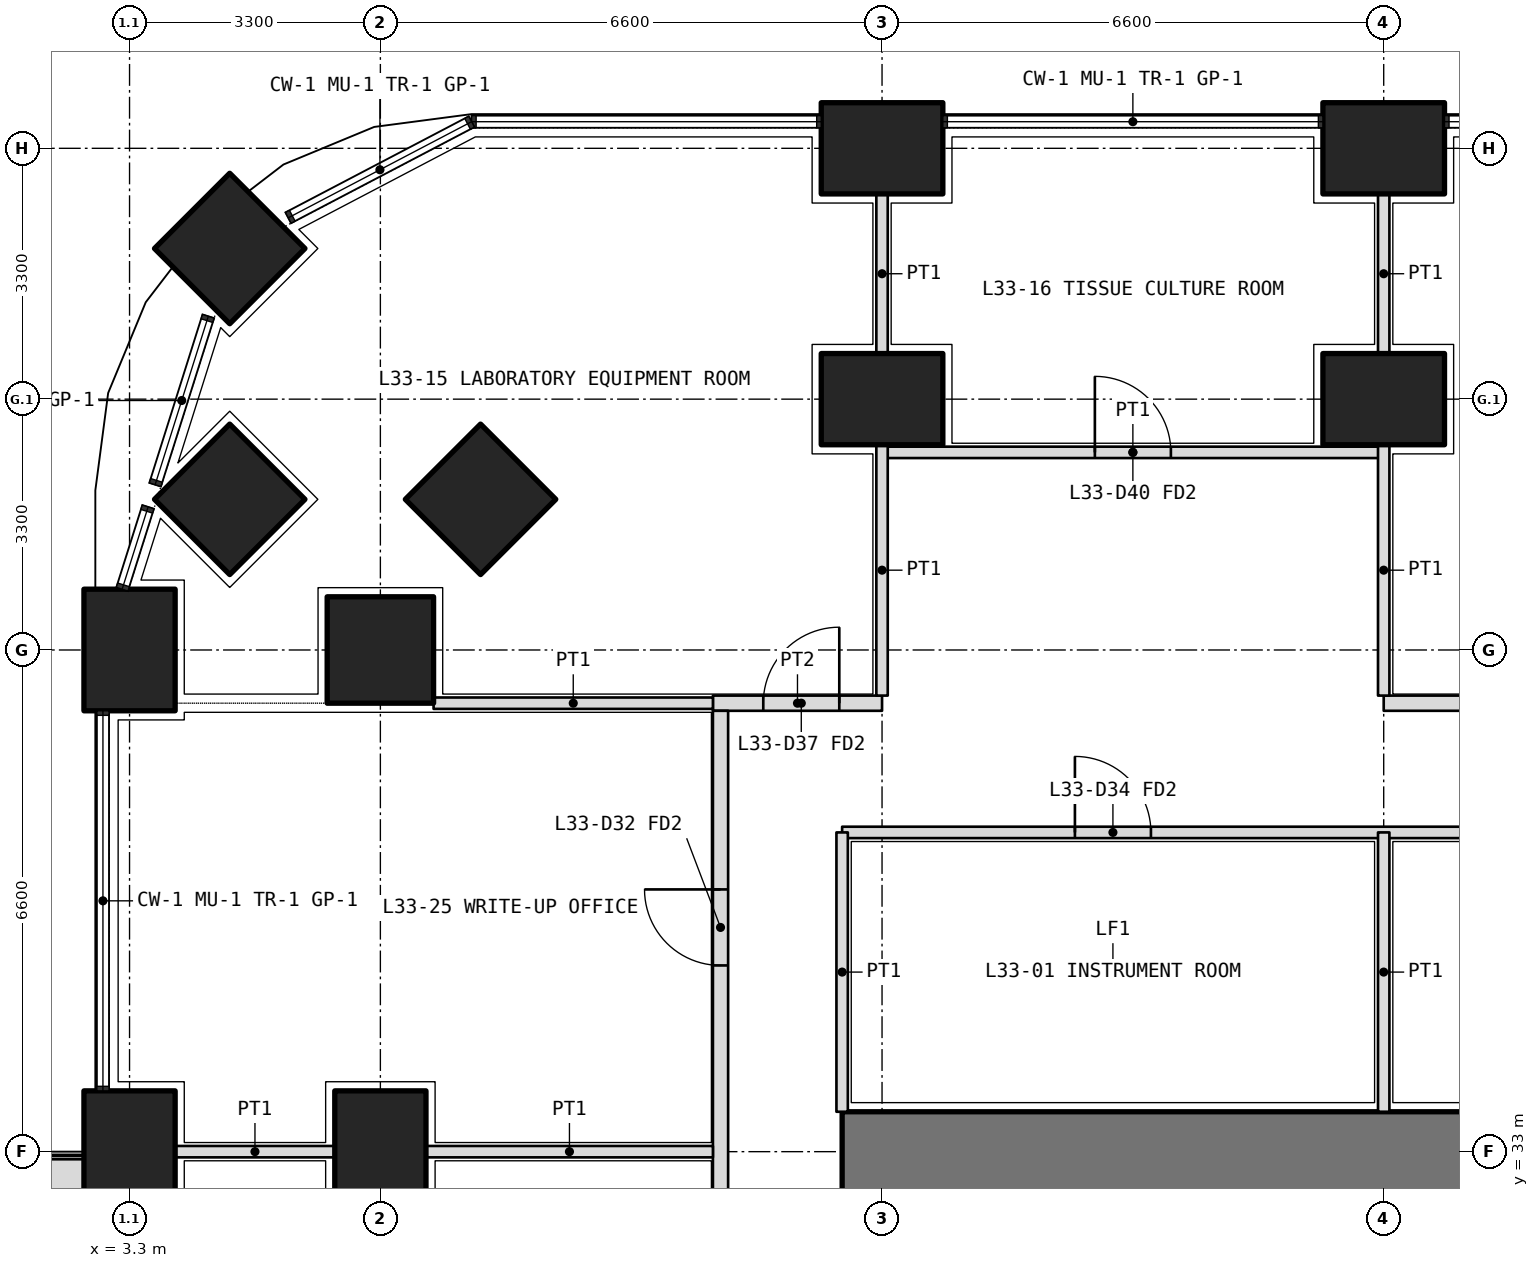
"""IFC4 building model, lengths in metres.
Left out: names, types, materials, properties, quantities, classifications, styles, units other than length and angle.
Written with IfcOpenShell. Run it as: python <this file> out.ifc"""

import sys

from ifc_helpers import new_model, si_unit, direction, frame, frame_2d, origin, origin_2d, place, context, subcontext, project, spatial, polyline, rectangle, outline, extrude, element, fill, save


model = new_model("IFC4")
c1 = context("Model", 3, precision=1e-05, world=origin(), true_north=direction((0.0, 1.0)))
c2 = subcontext(c1, "Body", "Model", "MODEL_VIEW")
j1 = project(units=[si_unit("LENGTHUNIT", "METRE"), si_unit("PLANEANGLEUNIT", "RADIAN")], contexts=[c1])
p1 = place(None, origin())
s1 = spatial("IfcSite", under=j1, at=p1, CompositionType="ELEMENT")
p2 = place(p1, origin())
s2 = spatial("IfcBuilding", under=s1, at=p2, CompositionType="ELEMENT")
p3 = place(p2, frame((0.0, 0.0, 145.2)))
s3 = spatial("IfcBuildingStorey", under=s2, at=p3, CompositionType="ELEMENT", Elevation=145.2)
p4 = place(p3, frame((4.618, 44.882, 0.0), z_axis=(0.0, 0.0, 1.0), x_axis=(0.707106781187, 0.707106781187, 0.0)))
e1 = element("IfcColumn", 1, at=p4, inside=s3, PredefinedType="COLUMN", context=c2, shape_type="SweptSolid", body=[
    extrude(rectangle(XDim=1.4, YDim=1.4, at=origin_2d()), origin(), (0.0, 0.0, 1.0), 4.2),
])
for number, where, z_axis, x_axis in (
    (2, (3.3, 33.0, 0.0), (0.0, 0.0, 1.0), (0.0, 1.0, 0.0)),
    (3, (3.3, 39.6, 0.0), (0.0, 0.0, 1.0), (0.0, 1.0, 0.0)),
    (4, (13.2, 46.2, 0.0), (0.0, 0.0, 1.0), (1.0, 0.0, 0.0)),
    (5, (19.8, 46.2, 0.0), (0.0, 0.0, 1.0), (1.0, 0.0, 0.0)),
):
    element("IfcColumn", number, at=place(p3, frame(where, z_axis=z_axis, x_axis=x_axis)), inside=s3, PredefinedType="COLUMN", context=c2, shape_type="SweptSolid", body=[
        extrude(rectangle(XDim=1.6, YDim=1.2, at=origin_2d()), origin(), (0.0, 0.0, 1.0), 4.2),
    ])
for number, where, z_axis, x_axis in (
    (6, (6.6, 39.6, 0.0), (0.0, 0.0, 1.0), (1.0, 0.0, 0.0)),
    (7, (4.618, 41.582, 0.0), (0.0, 0.0, 1.0), (0.707, 0.707, 0.0)),
):
    element("IfcColumn", number, at=place(p3, frame(where, z_axis=z_axis, x_axis=x_axis)), inside=s3, PredefinedType="COLUMN", context=c2, shape_type="SweptSolid", body=[
        extrude(rectangle(XDim=1.4, YDim=1.4, at=origin_2d()), origin(), (0.0, 0.0, 1.0), 4.2),
    ])
for number, where, z_axis, x_axis in (
    (8, (13.2, 42.9, 0.0), (0.0, 0.0, 1.0), (1.0, 0.0, 0.0)),
    (9, (19.8, 42.9, 0.0), (0.0, 0.0, 1.0), (1.0, 0.0, 0.0)),
):
    element("IfcColumn", number, at=place(p3, frame(where, z_axis=z_axis, x_axis=x_axis)), inside=s3, PredefinedType="COLUMN", context=c2, shape_type="SweptSolid", body=[
        extrude(rectangle(XDim=1.6, YDim=1.2, at=origin_2d()), origin(), (0.0, 0.0, 1.0), 4.2),
    ])
p5 = place(p3, frame((7.918, 41.582, 0.0), z_axis=(0.0, 0.0, 1.0), x_axis=(0.707106781187, 0.707106781187, 0.0)))
e10 = element("IfcColumn", 10, at=p5, inside=s3, PredefinedType="COLUMN", context=c2, shape_type="SweptSolid", body=[
    extrude(rectangle(XDim=1.4, YDim=1.4, at=origin_2d()), origin(), (0.0, 0.0, 1.0), 4.2),
])
p6 = place(p3, frame((6.6, 33.0, 0.0), z_axis=(0.0, 0.0, 1.0), x_axis=(0.0, 1.0, 0.0)))
e11 = element("IfcColumn", 11, at=p6, inside=s3, PredefinedType="COLUMN", context=c2, shape_type="SweptSolid", body=[
    extrude(rectangle(XDim=1.6, YDim=1.2, at=origin_2d()), origin(), (0.0, 0.0, 1.0), 4.2),
])
p7 = place(p3, origin())
e12 = element("IfcWall", 12, at=p7, inside=s3, PredefinedType="USERDEFINED", context=c2, shape_type="SweptSolid", body=[
    extrude(outline(polyline([(1.75, 23.85), (2.75, 23.85), (2.75, 32.9), (1.75, 32.9), (1.75, 23.85)]), holes=[polyline([(1.9, 24.0), (2.6, 24.0), (2.6, 32.75), (1.9, 32.75), (1.9, 24.0)])]), origin(), (0.0, 0.0, 1.0), 1.05),
])
p8 = place(p3, frame((40.125, 33.0, 0.0), z_axis=(0.0, 0.0, 1.0), x_axis=(-1.0, 0.0, 0.0)))
e13 = element("IfcWall", 13, at=p8, inside=s3, PredefinedType="SHEAR", context=c2, shape_type="SweptSolid", body=[
    extrude(rectangle(XDim=27.45, YDim=1.05, at=frame_2d((13.725, 0.0))), origin(), (0.0, 0.0, 1.0), 4.2),
])
p9 = place(p3, frame((12.675, 37.2, 0.0), z_axis=(0.0, 0.0, 1.0), x_axis=(1.0, 0.0, 0.0)))
e14 = element("IfcWall", 14, at=p9, inside=s3, PredefinedType="PARTITIONING", context=c2, shape_type="SweptSolid", body=[
    extrude(rectangle(XDim=27.45, YDim=0.15, at=frame_2d((13.725, 0.0))), origin(), (0.0, 0.0, 1.0), 2.55),
])
p10 = place(p9, frame((3.062, 0.0, 0.0)))
e15 = element("IfcOpeningElement", 15, at=p10, cuts=e14, PredefinedType="OPENING", context=c2, shape_type="SweptSolid", body=[
    extrude(rectangle(XDim=1.0, YDim=2.1, at=frame_2d((0.5, 1.05))), frame((0.0, 0.085, 0.0), z_axis=(0.0, -1.0, 0.0), x_axis=(1.0, 0.0, 0.0)), (0.0, 0.0, 1.0), 0.17),
])
p11 = place(p9, frame((13.225, 0.0, 0.0)))
e16 = element("IfcOpeningElement", 16, at=p11, cuts=e14, PredefinedType="OPENING", context=c2, shape_type="SweptSolid", body=[
    extrude(rectangle(XDim=1.0, YDim=2.1, at=frame_2d((0.5, 1.05))), frame((0.0, 0.085, 0.0), z_axis=(0.0, -1.0, 0.0), x_axis=(1.0, 0.0, 0.0)), (0.0, 0.0, 1.0), 0.17),
])
p12 = place(p9, frame((23.387, 0.0, 0.0)))
e17 = element("IfcOpeningElement", 17, at=p12, cuts=e14, PredefinedType="OPENING", context=c2, shape_type="SweptSolid", body=[
    extrude(rectangle(XDim=1.0, YDim=2.1, at=frame_2d((0.5, 1.05))), frame((0.0, 0.085, 0.0), z_axis=(0.0, -1.0, 0.0), x_axis=(1.0, 0.0, 0.0)), (0.0, 0.0, 1.0), 0.17),
])
for number, where, z_axis, x_axis in (
    (18, (12.675, 33.525, 0.0), (0.0, 0.0, 1.0), (0.0, 1.0, 0.0)),
    (19, (19.8, 33.525, 0.0), (0.0, 0.0, 1.0), (0.0, 1.0, 0.0)),
):
    element("IfcWall", number, at=place(p3, frame(where, z_axis=z_axis, x_axis=x_axis)), inside=s3, PredefinedType="PARTITIONING", context=c2, shape_type="SweptSolid", body=[
        extrude(rectangle(XDim=3.675, YDim=0.15, at=frame_2d((1.837, 0.0))), origin(), (0.0, 0.0, 1.0), 2.55),
    ])
p13 = place(p3, frame((10.975, 38.9, 0.0), z_axis=(0.0, 0.0, 1.0), x_axis=(1.0, 0.0, 0.0)))
e20 = element("IfcWall", 20, at=p13, inside=s3, PredefinedType="PARTITIONING", context=c2, shape_type="SweptSolid", body=[
    extrude(rectangle(XDim=2.225, YDim=0.2, at=frame_2d((1.112, 0.0))), origin(), (0.0, 0.0, 1.0), 2.55),
])
p14 = place(p13, frame((0.663, 0.0, 0.0)))
e21 = element("IfcOpeningElement", 21, at=p14, cuts=e20, PredefinedType="OPENING", context=c2, shape_type="SweptSolid", body=[
    extrude(rectangle(XDim=1.0, YDim=2.1, at=frame_2d((0.5, 1.05))), frame((0.0, 0.11, 0.0), z_axis=(0.0, -1.0, 0.0), x_axis=(1.0, 0.0, 0.0)), (0.0, 0.0, 1.0), 0.22),
])
p15 = place(p3, frame((19.8, 38.9, 0.0), z_axis=(0.0, 0.0, 1.0), x_axis=(1.0, 0.0, 0.0)))
e22 = element("IfcWall", 22, at=p15, inside=s3, PredefinedType="PARTITIONING", context=c2, shape_type="SweptSolid", body=[
    extrude(rectangle(XDim=22.025, YDim=0.2, at=frame_2d((11.012, 0.0))), origin(), (0.0, 0.0, 1.0), 2.55),
])
p16 = place(p15, frame((6.1, 0.0, 0.0)))
e23 = element("IfcOpeningElement", 23, at=p16, cuts=e22, PredefinedType="OPENING", context=c2, shape_type="SweptSolid", body=[
    extrude(rectangle(XDim=1.0, YDim=2.1, at=frame_2d((0.5, 1.05))), frame((0.0, 0.11, 0.0), z_axis=(0.0, -1.0, 0.0), x_axis=(1.0, 0.0, 0.0)), (0.0, 0.0, 1.0), 0.22),
])
p17 = place(p15, frame((16.962, 0.0, 0.0)))
e24 = element("IfcOpeningElement", 24, at=p17, cuts=e22, PredefinedType="OPENING", context=c2, shape_type="SweptSolid", body=[
    extrude(rectangle(XDim=1.2, YDim=2.1, at=frame_2d((0.6, 1.05))), frame((0.0, 0.11, 0.0), z_axis=(0.0, -1.0, 0.0), x_axis=(1.0, 0.0, 0.0)), (0.0, 0.0, 1.0), 0.22),
])
p18 = place(p3, frame((11.075, 11.175, 0.0), z_axis=(0.0, 0.0, 1.0), x_axis=(0.0, 1.0, 0.0)))
e25 = element("IfcWall", 25, at=p18, inside=s3, PredefinedType="PARTITIONING", context=c2, shape_type="SweptSolid", body=[
    extrude(rectangle(XDim=27.625, YDim=0.2, at=frame_2d((13.812, 0.0))), origin(), (0.0, 0.0, 1.0), 2.55),
])
p19 = place(p18, frame((0.462, 0.0, 0.0)))
e26 = element("IfcOpeningElement", 26, at=p19, cuts=e25, PredefinedType="OPENING", context=c2, shape_type="SweptSolid", body=[
    extrude(rectangle(XDim=1.0, YDim=2.1, at=frame_2d((0.5, 1.05))), frame((0.0, 0.11, 0.0), z_axis=(0.0, -1.0, 0.0), x_axis=(1.0, 0.0, 0.0)), (0.0, 0.0, 1.0), 0.22),
])
p20 = place(p18, frame((2.575, 0.0, 0.0)))
e27 = element("IfcOpeningElement", 27, at=p20, cuts=e25, PredefinedType="OPENING", context=c2, shape_type="SweptSolid", body=[
    extrude(rectangle(XDim=1.0, YDim=2.1, at=frame_2d((0.5, 1.05))), frame((0.0, 0.11, 0.0), z_axis=(0.0, -1.0, 0.0), x_axis=(1.0, 0.0, 0.0)), (0.0, 0.0, 1.0), 0.22),
])
p21 = place(p18, frame((5.65, 0.0, 0.0)))
e28 = element("IfcOpeningElement", 28, at=p21, cuts=e25, PredefinedType="OPENING", context=c2, shape_type="SweptSolid", body=[
    extrude(rectangle(XDim=0.9, YDim=2.1, at=frame_2d((0.45, 1.05))), frame((0.0, 0.11, 0.0), z_axis=(0.0, -1.0, 0.0), x_axis=(1.0, 0.0, 0.0)), (0.0, 0.0, 1.0), 0.22),
])
p22 = place(p18, frame((9.5, 0.0, 0.0)))
e29 = element("IfcOpeningElement", 29, at=p22, cuts=e25, PredefinedType="OPENING", context=c2, shape_type="SweptSolid", body=[
    extrude(rectangle(XDim=0.9, YDim=2.1, at=frame_2d((0.45, 1.05))), frame((0.0, 0.11, 0.0), z_axis=(0.0, -1.0, 0.0), x_axis=(1.0, 0.0, 0.0)), (0.0, 0.0, 1.0), 0.22),
])
p23 = place(p18, frame((13.025, 0.0, 0.0)))
e30 = element("IfcOpeningElement", 30, at=p23, cuts=e25, PredefinedType="OPENING", context=c2, shape_type="SweptSolid", body=[
    extrude(rectangle(XDim=1.0, YDim=2.1, at=frame_2d((0.5, 1.05))), frame((0.0, 0.11, 0.0), z_axis=(0.0, -1.0, 0.0), x_axis=(1.0, 0.0, 0.0)), (0.0, 0.0, 1.0), 0.22),
])
p24 = place(p18, frame((18.025, 0.0, 0.0)))
e31 = element("IfcOpeningElement", 31, at=p24, cuts=e25, PredefinedType="OPENING", context=c2, shape_type="SweptSolid", body=[
    extrude(rectangle(XDim=1.0, YDim=2.1, at=frame_2d((0.5, 1.05))), frame((0.0, 0.11, 0.0), z_axis=(0.0, -1.0, 0.0), x_axis=(1.0, 0.0, 0.0)), (0.0, 0.0, 1.0), 0.22),
])
p25 = place(p18, frame((24.275, 0.0, 0.0)))
e32 = element("IfcOpeningElement", 32, at=p25, cuts=e25, PredefinedType="OPENING", context=c2, shape_type="SweptSolid", body=[
    extrude(rectangle(XDim=1.0, YDim=2.1, at=frame_2d((0.5, 1.05))), frame((0.0, 0.11, 0.0), z_axis=(0.0, -1.0, 0.0), x_axis=(1.0, 0.0, 0.0)), (0.0, 0.0, 1.0), 0.22),
])
p26 = place(p3, frame((7.3, 38.9, 0.0), z_axis=(0.0, 0.0, 1.0), x_axis=(1.0, 0.0, 0.0)))
e33 = element("IfcWall", 33, at=p26, inside=s3, PredefinedType="PARTITIONING", context=c2, shape_type="SweptSolid", body=[
    extrude(rectangle(XDim=3.675, YDim=0.15, at=frame_2d((1.837, 0.0))), origin(), (0.0, 0.0, 1.0), 2.55),
])
p27 = place(p3, frame((13.2, 42.2, 0.0), z_axis=(0.0, 0.0, 1.0), x_axis=(1.0, 0.0, 0.0)))
e34 = element("IfcWall", 34, at=p27, inside=s3, PredefinedType="PARTITIONING", context=c2, shape_type="SweptSolid", body=[
    extrude(rectangle(XDim=6.6, YDim=0.15, at=frame_2d((3.3, 0.0))), origin(), (0.0, 0.0, 1.0), 2.55),
])
p28 = place(p27, frame((2.8, 0.0, 0.0)))
e35 = element("IfcOpeningElement", 35, at=p28, cuts=e34, PredefinedType="OPENING", context=c2, shape_type="SweptSolid", body=[
    extrude(rectangle(XDim=1.0, YDim=2.1, at=frame_2d((0.5, 1.05))), frame((0.0, 0.085, 0.0), z_axis=(0.0, -1.0, 0.0), x_axis=(1.0, 0.0, 0.0)), (0.0, 0.0, 1.0), 0.17),
])
p29 = place(p3, frame((13.2, 45.6, 0.0), z_axis=(0.0, 0.0, 1.0), x_axis=(0.0, -1.0, 0.0)))
e36 = element("IfcWall", 36, at=p29, inside=s3, PredefinedType="PARTITIONING", context=c2, shape_type="SweptSolid", body=[
    extrude(rectangle(XDim=2.1, YDim=0.15, at=frame_2d((1.05, 0.0))), origin(), (0.0, 0.0, 1.0), 2.55),
])
p30 = place(p3, frame((13.2, 42.3, 0.0), z_axis=(0.0, 0.0, 1.0), x_axis=(0.0, -1.0, 0.0)))
e37 = element("IfcWall", 37, at=p30, inside=s3, PredefinedType="PARTITIONING", context=c2, shape_type="SweptSolid", body=[
    extrude(rectangle(XDim=3.3, YDim=0.15, at=frame_2d((1.65, 0.0))), origin(), (0.0, 0.0, 1.0), 2.55),
])
p31 = place(p3, frame((19.8, 45.6, 0.0), z_axis=(0.0, 0.0, 1.0), x_axis=(0.0, -1.0, 0.0)))
e38 = element("IfcWall", 38, at=p31, inside=s3, PredefinedType="PARTITIONING", context=c2, shape_type="SweptSolid", body=[
    extrude(rectangle(XDim=2.1, YDim=0.15, at=frame_2d((1.05, 0.0))), origin(), (0.0, 0.0, 1.0), 2.55),
])
p32 = place(p3, frame((19.8, 42.3, 0.0), z_axis=(0.0, 0.0, 1.0), x_axis=(0.0, -1.0, 0.0)))
e39 = element("IfcWall", 39, at=p32, inside=s3, PredefinedType="PARTITIONING", context=c2, shape_type="SweptSolid", body=[
    extrude(rectangle(XDim=3.3, YDim=0.15, at=frame_2d((1.65, 0.0))), origin(), (0.0, 0.0, 1.0), 2.55),
])
p33 = place(p3, frame((3.9, 33.0, 0.0), z_axis=(0.0, 0.0, 1.0), x_axis=(1.0, 0.0, 0.0)))
e40 = element("IfcWall", 40, at=p33, inside=s3, PredefinedType="PARTITIONING", context=c2, shape_type="SweptSolid", body=[
    extrude(rectangle(XDim=2.1, YDim=0.15, at=frame_2d((1.05, 0.0))), origin(), (0.0, 0.0, 1.0), 2.55),
])
p34 = place(p3, frame((7.2, 33.0, 0.0), z_axis=(0.0, 0.0, 1.0), x_axis=(1.0, 0.0, 0.0)))
e41 = element("IfcWall", 41, at=p34, inside=s3, PredefinedType="PARTITIONING", context=c2, shape_type="SweptSolid", body=[
    extrude(rectangle(XDim=3.775, YDim=0.15, at=frame_2d((1.888, 0.0))), origin(), (0.0, 0.0, 1.0), 2.55),
])
p35 = place(p10, origin())
e42 = element("IfcDoor", 42, at=p35, inside=s3, OperationType="SINGLE_SWING_LEFT", PredefinedType="DOOR", context=c2, shape_type="SweptSolid", body=[
    extrude(rectangle(XDim=1.0, YDim=2.1, at=frame_2d((0.5, 1.05))), frame((0.0, 0.025, 0.0), z_axis=(0.0, -1.0, 0.0), x_axis=(1.0, 0.0, 0.0)), (0.0, 0.0, 1.0), 0.05),
])
fill(e15, e42)
p36 = place(p14, origin())
e43 = element("IfcDoor", 43, at=p36, inside=s3, OperationType="SINGLE_SWING_RIGHT", PredefinedType="DOOR", context=c2, shape_type="SweptSolid", body=[
    extrude(rectangle(XDim=1.0, YDim=2.1, at=frame_2d((0.5, 1.05))), frame((0.0, 0.025, 0.0), z_axis=(0.0, -1.0, 0.0), x_axis=(1.0, 0.0, 0.0)), (0.0, 0.0, 1.0), 0.05),
])
fill(e21, e43)
p37 = place(p28, origin())
e44 = element("IfcDoor", 44, at=p37, inside=s3, OperationType="SINGLE_SWING_LEFT", PredefinedType="DOOR", context=c2, shape_type="SweptSolid", body=[
    extrude(rectangle(XDim=1.0, YDim=2.1, at=frame_2d((0.5, 1.05))), frame((0.0, 0.025, 0.0), z_axis=(0.0, -1.0, 0.0), x_axis=(1.0, 0.0, 0.0)), (0.0, 0.0, 1.0), 0.05),
])
fill(e35, e44)
p38 = place(p25, origin())
e45 = element("IfcDoor", 45, at=p38, inside=s3, OperationType="SINGLE_SWING_RIGHT", PredefinedType="DOOR", context=c2, shape_type="SweptSolid", body=[
    extrude(rectangle(XDim=1.0, YDim=2.1, at=frame_2d((0.5, 1.05))), frame((0.0, 0.025, 0.0), z_axis=(0.0, -1.0, 0.0), x_axis=(1.0, 0.0, 0.0)), (0.0, 0.0, 1.0), 0.05),
])
fill(e32, e45)
save(model, sys.argv[1])
